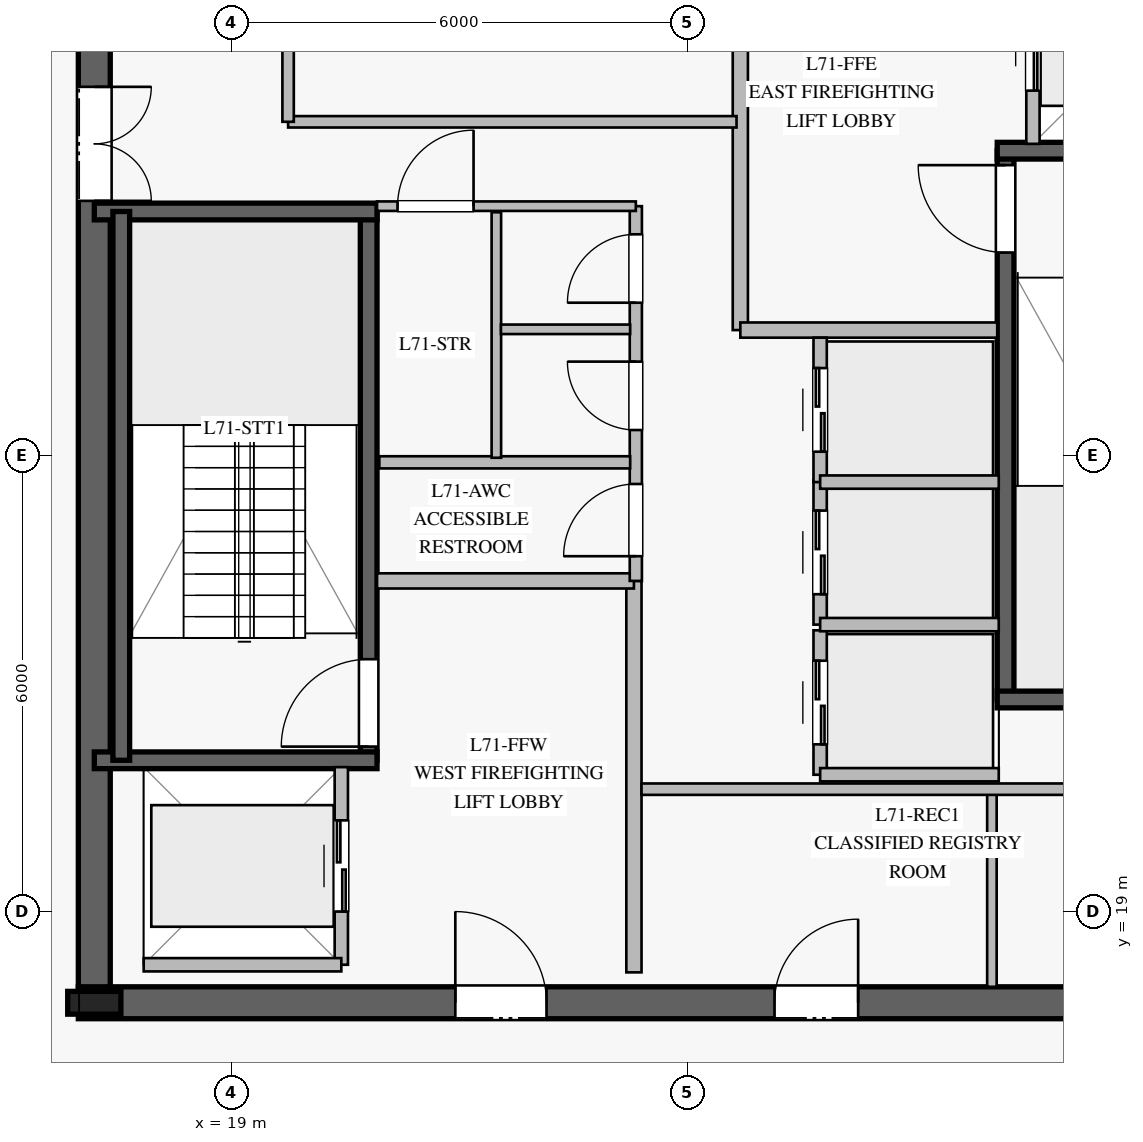
"""IFC4 building model, lengths in metres.
Left out: names, types, materials, properties, quantities, classifications, styles, units other than length and angle.
Written with IfcOpenShell. Run it as: python <this file> out.ifc"""

import sys

from ifc_helpers import new_model, si_unit, direction, frame, frame_2d, origin, origin_2d, place, context, subcontext, project, spatial, rectangle, i_section, extrude, element, fill, save


model = new_model("IFC4")
c1 = context("Model", 3, precision=1e-05, world=origin(), true_north=direction((0.0, 1.0)))
c2 = subcontext(c1, "Body", "Model", "MODEL_VIEW")
j1 = project(units=[si_unit("LENGTHUNIT", "METRE"), si_unit("PLANEANGLEUNIT", "RADIAN")], contexts=[c1])
p1 = place(None, origin())
s1 = spatial("IfcSite", under=j1, at=p1, CompositionType="ELEMENT")
p2 = place(p1, origin())
s2 = spatial("IfcBuilding", under=s1, at=p2, CompositionType="ELEMENT")
p3 = place(p2, frame((0.0, 0.0, 294.2)))
s3 = spatial("IfcBuildingStorey", under=s2, at=p3, CompositionType="ELEMENT", Elevation=294.2)
p4 = place(p3, frame((16.99, 17.8, 0.0), z_axis=(0.0, 0.0, 1.0), x_axis=(1.0, 0.0, 0.0)))
e1 = element("IfcWall", 1, at=p4, inside=s3, PredefinedType="SHEAR", context=c2, shape_type="SweptSolid", body=[
    extrude(rectangle(XDim=16.02, YDim=0.42, at=frame_2d((8.01, 0.0))), origin(), (0.0, 0.0, 1.0), 3.78),
])
p5 = place(p4, frame((4.96, 0.0, 0.0)))
e2 = element("IfcOpeningElement", 2, at=p5, cuts=e1, PredefinedType="OPENING", context=c2, shape_type="SweptSolid", body=[
    extrude(rectangle(XDim=1.2, YDim=2.25, at=frame_2d((0.6, 1.125))), frame((0.0, 0.22, 0.0), z_axis=(0.0, -1.0, 0.0), x_axis=(1.0, 0.0, 0.0)), (0.0, 0.0, 1.0), 0.44),
])
p6 = place(p4, frame((13.91, 0.0, 0.0)))
e3 = element("IfcOpeningElement", 3, at=p6, cuts=e1, PredefinedType="OPENING", context=c2, shape_type="SweptSolid", body=[
    extrude(rectangle(XDim=0.9, YDim=2.1, at=frame_2d((0.45, 1.05))), frame((0.0, 0.22, 0.0), z_axis=(0.0, -1.0, 0.0), x_axis=(1.0, 0.0, 0.0)), (0.0, 0.0, 1.0), 0.44),
])
p7 = place(p4, frame((9.16, 0.0, 0.0)))
e4 = element("IfcOpeningElement", 4, at=p7, cuts=e1, PredefinedType="OPENING", context=c2, shape_type="SweptSolid", body=[
    extrude(rectangle(XDim=1.1, YDim=2.2, at=frame_2d((0.55, 1.1))), frame((0.0, 0.22, 0.0), z_axis=(0.0, -1.0, 0.0), x_axis=(1.0, 0.0, 0.0)), (0.0, 0.0, 1.0), 0.44),
])
p8 = place(p3, frame((17.2, 31.99, 0.0), z_axis=(0.0, 0.0, 1.0), x_axis=(0.0, -1.0, 0.0)))
e5 = element("IfcWall", 5, at=p8, inside=s3, PredefinedType="SHEAR", context=c2, shape_type="SweptSolid", body=[
    extrude(rectangle(XDim=13.98, YDim=0.42, at=frame_2d((6.99, 0.0))), origin(), (0.0, 0.0, 1.0), 3.78),
])
p9 = place(p8, frame((2.14, 0.0, 0.0)))
e6 = element("IfcOpeningElement", 6, at=p9, cuts=e5, PredefinedType="OPENING", context=c2, shape_type="SweptSolid", body=[
    extrude(rectangle(XDim=1.5, YDim=2.2, at=frame_2d((0.75, 1.1))), frame((0.0, 0.22, 0.0), z_axis=(0.0, -1.0, 0.0), x_axis=(1.0, 0.0, 0.0)), (0.0, 0.0, 1.0), 0.44),
])
p10 = place(p3, frame((17.2, 17.8, 0.0), z_axis=(0.0, 0.0, 1.0), x_axis=(1.0, 0.0, 0.0)))
e7 = element("IfcColumn", 7, at=p10, inside=s3, PredefinedType="COLUMN", context=c2, shape_type="SweptSolid", body=[
    extrude(i_section(OverallWidth=0.3, OverallDepth=0.7, WebThickness=0.017, FlangeThickness=0.032, at=origin_2d()), origin(), (0.0, 0.0, 1.0), 4.0),
])
p11 = place(p3, frame((20.81, 20.99, 0.0), z_axis=(0.0, 0.0, 1.0), x_axis=(0.0, 1.0, 0.0)))
e8 = element("IfcWall", 8, at=p11, inside=s3, PredefinedType="SOLIDWALL", context=c2, shape_type="SweptSolid", body=[
    extrude(rectangle(XDim=7.22, YDim=0.22, at=frame_2d((3.61, 0.0))), origin(), (0.0, 0.0, 1.0), 3.78),
])
p12 = place(p11, frame((0.18, 0.0, 0.0)))
e9 = element("IfcOpeningElement", 9, at=p12, cuts=e8, PredefinedType="OPENING", context=c2, shape_type="SweptSolid", body=[
    extrude(rectangle(XDim=1.15, YDim=2.2, at=frame_2d((0.575, 1.1))), frame((0.0, 0.12, 0.0), z_axis=(0.0, -1.0, 0.0), x_axis=(1.0, 0.0, 0.0)), (0.0, 0.0, 1.0), 0.24),
])
for number, where, z_axis, x_axis in (
    (10, (17.2, 20.99, 0.0), (0.0, 0.0, 1.0), (1.0, 0.0, 0.0)),
    (11, (17.2, 28.21, 0.0), (0.0, 0.0, 1.0), (1.0, 0.0, 0.0)),
):
    element("IfcWall", number, at=place(p3, frame(where, z_axis=z_axis, x_axis=x_axis)), inside=s3, PredefinedType="SOLIDWALL", context=c2, shape_type="SweptSolid", body=[
        extrude(rectangle(XDim=3.72, YDim=0.22, at=frame_2d((1.86, 0.0))), origin(), (0.0, 0.0, 1.0), 3.78),
    ])
p13 = place(p3, frame((17.555, 28.21, 0.0), z_axis=(0.0, 0.0, 1.0), x_axis=(0.0, -1.0, 0.0)))
e12 = element("IfcWall", 12, at=p13, inside=s3, PredefinedType="SOLIDWALL", context=c2, shape_type="SweptSolid", body=[
    extrude(rectangle(XDim=7.22, YDim=0.22, at=frame_2d((3.61, 0.0))), origin(), (0.0, 0.0, 1.0), 3.78),
])
p14 = place(p3, frame((29.19, 21.79, 0.0), z_axis=(0.0, 0.0, 1.0), x_axis=(0.0, 1.0, 0.0)))
e13 = element("IfcWall", 13, at=p14, inside=s3, PredefinedType="SOLIDWALL", context=c2, shape_type="SweptSolid", body=[
    extrude(rectangle(XDim=7.22, YDim=0.22, at=frame_2d((3.61, 0.0))), origin(), (0.0, 0.0, 1.0), 3.78),
])
p15 = place(p14, frame((5.88, 0.0, 0.0)))
e14 = element("IfcOpeningElement", 14, at=p15, cuts=e13, PredefinedType="OPENING", context=c2, shape_type="SweptSolid", body=[
    extrude(rectangle(XDim=1.15, YDim=2.2, at=frame_2d((0.575, 1.1))), frame((0.0, 0.12, 0.0), z_axis=(0.0, -1.0, 0.0), x_axis=(1.0, 0.0, 0.0)), (0.0, 0.0, 1.0), 0.24),
])
for number, where, z_axis, x_axis in (
    (15, (29.08, 21.79, 0.0), (0.0, 0.0, 1.0), (1.0, 0.0, 0.0)),
    (16, (29.08, 29.01, 0.0), (0.0, 0.0, 1.0), (1.0, 0.0, 0.0)),
):
    element("IfcWall", number, at=place(p3, frame(where, z_axis=z_axis, x_axis=x_axis)), inside=s3, PredefinedType="SOLIDWALL", context=c2, shape_type="SweptSolid", body=[
        extrude(rectangle(XDim=3.72, YDim=0.22, at=frame_2d((1.86, 0.0))), origin(), (0.0, 0.0, 1.0), 3.78),
    ])
p16 = place(p3, frame((24.3, 18.2, 0.0), z_axis=(0.0, 0.0, 1.0), x_axis=(0.0, 1.0, 0.0)))
e17 = element("IfcWall", 17, at=p16, inside=s3, PredefinedType="PARTITIONING", context=c2, shape_type="SweptSolid", body=[
    extrude(rectangle(XDim=5.15, YDim=0.2, at=frame_2d((2.575, 0.0))), origin(), (0.0, 0.0, 1.0), 3.78),
])
p17 = place(p3, frame((20.92, 23.35, 0.0), z_axis=(0.0, 0.0, 1.0), x_axis=(1.0, 0.0, 0.0)))
e18 = element("IfcWall", 18, at=p17, inside=s3, PredefinedType="PARTITIONING", context=c2, shape_type="SweptSolid", body=[
    extrude(rectangle(XDim=3.38, YDim=0.2, at=frame_2d((1.69, 0.0))), origin(), (0.0, 0.0, 1.0), 3.78),
])
p18 = place(p3, frame((25.7, 26.65, 0.0), z_axis=(0.0, 0.0, 1.0), x_axis=(0.0, 1.0, 0.0)))
e19 = element("IfcWall", 19, at=p18, inside=s3, PredefinedType="PARTITIONING", context=c2, shape_type="SweptSolid", body=[
    extrude(rectangle(XDim=5.15, YDim=0.2, at=frame_2d((2.575, 0.0))), origin(), (0.0, 0.0, 1.0), 3.78),
])
p19 = place(p3, frame((25.7, 26.65, 0.0), z_axis=(0.0, 0.0, 1.0), x_axis=(1.0, 0.0, 0.0)))
e20 = element("IfcWall", 20, at=p19, inside=s3, PredefinedType="PARTITIONING", context=c2, shape_type="SweptSolid", body=[
    extrude(rectangle(XDim=3.38, YDim=0.2, at=frame_2d((1.69, 0.0))), origin(), (0.0, 0.0, 1.0), 3.78),
])
p20 = place(p3, frame((24.325, 23.35, 0.0), z_axis=(0.0, 0.0, 1.0), x_axis=(0.0, 1.0, 0.0)))
e21 = element("IfcWall", 21, at=p20, inside=s3, PredefinedType="PLUMBINGWALL", context=c2, shape_type="SweptSolid", body=[
    extrude(rectangle(XDim=4.93, YDim=0.16, at=frame_2d((2.465, 0.0))), origin(), (0.0, 0.0, 1.0), 3.78),
])
p21 = place(p20, frame((0.325, 0.0, 0.0)))
e22 = element("IfcOpeningElement", 22, at=p21, cuts=e21, PredefinedType="OPENING", context=c2, shape_type="SweptSolid", body=[
    extrude(rectangle(XDim=0.95, YDim=2.1, at=frame_2d((0.475, 1.05))), frame((0.0, 0.09, 0.0), z_axis=(0.0, -1.0, 0.0), x_axis=(1.0, 0.0, 0.0)), (0.0, 0.0, 1.0), 0.18),
])
p22 = place(p20, frame((1.985, 0.0, 0.0)))
e23 = element("IfcOpeningElement", 23, at=p22, cuts=e21, PredefinedType="OPENING", context=c2, shape_type="SweptSolid", body=[
    extrude(rectangle(XDim=0.9, YDim=2.1, at=frame_2d((0.45, 1.05))), frame((0.0, 0.09, 0.0), z_axis=(0.0, -1.0, 0.0), x_axis=(1.0, 0.0, 0.0)), (0.0, 0.0, 1.0), 0.18),
])
p23 = place(p20, frame((3.66, 0.0, 0.0)))
e24 = element("IfcOpeningElement", 24, at=p23, cuts=e21, PredefinedType="OPENING", context=c2, shape_type="SweptSolid", body=[
    extrude(rectangle(XDim=0.9, YDim=2.1, at=frame_2d((0.45, 1.05))), frame((0.0, 0.09, 0.0), z_axis=(0.0, -1.0, 0.0), x_axis=(1.0, 0.0, 0.0)), (0.0, 0.0, 1.0), 0.18),
])
p24 = place(p3, frame((20.92, 28.28, 0.0), z_axis=(0.0, 0.0, 1.0), x_axis=(1.0, 0.0, 0.0)))
e25 = element("IfcWall", 25, at=p24, inside=s3, PredefinedType="PARTITIONING", context=c2, shape_type="SweptSolid", body=[
    extrude(rectangle(XDim=3.405, YDim=0.125, at=frame_2d((1.703, 0.0))), origin(), (0.0, 0.0, 1.0), 3.78),
])
p25 = place(p24, frame((0.27, 0.0, 0.0)))
e26 = element("IfcOpeningElement", 26, at=p25, cuts=e25, PredefinedType="OPENING", context=c2, shape_type="SweptSolid", body=[
    extrude(rectangle(XDim=1.0, YDim=2.15, at=frame_2d((0.5, 1.075))), frame((0.0, 0.073, 0.0), z_axis=(0.0, -1.0, 0.0), x_axis=(1.0, 0.0, 0.0)), (0.0, 0.0, 1.0), 0.145),
])
p26 = place(p3, frame((29.01, 18.01, 0.0), z_axis=(0.0, 0.0, 1.0), x_axis=(0.0, 1.0, 0.0)))
e27 = element("IfcWall", 27, at=p26, inside=s3, PredefinedType="PARTITIONING", context=c2, shape_type="SweptSolid", body=[
    extrude(rectangle(XDim=2.54, YDim=0.125, at=frame_2d((1.27, 0.0))), origin(), (0.0, 0.0, 1.0), 3.78),
])
p27 = place(p3, frame((20.95, 24.91, 0.0), z_axis=(0.0, 0.0, 1.0), x_axis=(1.0, 0.0, 0.0)))
e28 = element("IfcWall", 28, at=p27, inside=s3, PredefinedType="PLUMBINGWALL", context=c2, shape_type="SweptSolid", body=[
    extrude(rectangle(XDim=3.3, YDim=0.16, at=frame_2d((1.65, 0.0))), origin(), (0.0, 0.0, 1.0), 3.78),
])
p28 = place(p3, frame((22.49, 24.97, 0.0), z_axis=(0.0, 0.0, 1.0), x_axis=(0.0, 1.0, 0.0)))
e29 = element("IfcWall", 29, at=p28, inside=s3, PredefinedType="PARTITIONING", context=c2, shape_type="SweptSolid", body=[
    extrude(rectangle(XDim=3.23, YDim=0.125, at=frame_2d((1.615, 0.0))), origin(), (0.0, 0.0, 1.0), 3.78),
])
p29 = place(p3, frame((22.55, 26.66, 0.0), z_axis=(0.0, 0.0, 1.0), x_axis=(1.0, 0.0, 0.0)))
e30 = element("IfcWall", 30, at=p29, inside=s3, PredefinedType="PARTITIONING", context=c2, shape_type="SweptSolid", body=[
    extrude(rectangle(XDim=1.7, YDim=0.125, at=frame_2d((0.85, 0.0))), origin(), (0.0, 0.0, 1.0), 3.78),
])
p30 = place(p3, frame((24.4, 20.61, 0.0), z_axis=(0.0, 0.0, 1.0), x_axis=(1.0, 0.0, 0.0)))
e31 = element("IfcWall", 31, at=p30, inside=s3, PredefinedType="PARTITIONING", context=c2, shape_type="SweptSolid", body=[
    extrude(rectangle(XDim=5.9, YDim=0.15, at=frame_2d((2.95, 0.0))), origin(), (0.0, 0.0, 1.0), 3.78),
])
p31 = place(p3, frame((19.75, 29.39, 0.0), z_axis=(0.0, 0.0, 1.0), x_axis=(1.0, 0.0, 0.0)))
e32 = element("IfcWall", 32, at=p31, inside=s3, PredefinedType="PARTITIONING", context=c2, shape_type="SweptSolid", body=[
    extrude(rectangle(XDim=5.9, YDim=0.15, at=frame_2d((2.95, 0.0))), origin(), (0.0, 0.0, 1.0), 3.78),
])
p32 = place(p3, frame((19.75, 29.39, 0.0), z_axis=(0.0, 0.0, 1.0), x_axis=(0.0, 1.0, 0.0)))
e33 = element("IfcWall", 33, at=p32, inside=s3, PredefinedType="PARTITIONING", context=c2, shape_type="SweptSolid", body=[
    extrude(rectangle(XDim=2.41, YDim=0.15, at=frame_2d((1.205, 0.0))), origin(), (0.0, 0.0, 1.0), 3.78),
])
p33 = place(p3, frame((26.75, 20.8, 0.0), z_axis=(0.0, 0.0, 1.0), x_axis=(0.0, 1.0, 0.0)))
e34 = element("IfcWall", 34, at=p33, inside=s3, PredefinedType="PARTITIONING", context=c2, shape_type="SweptSolid", body=[
    extrude(rectangle(XDim=1.9, YDim=0.175, at=frame_2d((0.95, 0.0))), origin(), (0.0, 0.0, 1.0), 3.78),
])
p34 = place(p33, frame((0.4, 0.0, 0.0)))
e35 = element("IfcOpeningElement", 35, at=p34, cuts=e34, PredefinedType="OPENING", context=c2, shape_type="SweptSolid", body=[
    extrude(rectangle(XDim=1.1, YDim=2.2, at=frame_2d((0.55, 1.1))), frame((0.0, 0.098, 0.0), z_axis=(0.0, -1.0, 0.0), x_axis=(1.0, 0.0, 0.0)), (0.0, 0.0, 1.0), 0.195),
])
p35 = place(p3, frame((26.75, 20.8, 0.0), z_axis=(0.0, 0.0, 1.0), x_axis=(1.0, 0.0, 0.0)))
e36 = element("IfcWall", 36, at=p35, inside=s3, PredefinedType="PARTITIONING", context=c2, shape_type="SweptSolid", body=[
    extrude(rectangle(XDim=2.35, YDim=0.175, at=frame_2d((1.175, 0.0))), origin(), (0.0, 0.0, 1.0), 3.78),
])
p36 = place(p3, frame((26.75, 22.775, 0.0), z_axis=(0.0, 0.0, 1.0), x_axis=(0.0, 1.0, 0.0)))
e37 = element("IfcWall", 37, at=p36, inside=s3, PredefinedType="PARTITIONING", context=c2, shape_type="SweptSolid", body=[
    extrude(rectangle(XDim=1.9, YDim=0.175, at=frame_2d((0.95, 0.0))), origin(), (0.0, 0.0, 1.0), 3.78),
])
p37 = place(p36, frame((0.4, 0.0, 0.0)))
e38 = element("IfcOpeningElement", 38, at=p37, cuts=e37, PredefinedType="OPENING", context=c2, shape_type="SweptSolid", body=[
    extrude(rectangle(XDim=1.1, YDim=2.2, at=frame_2d((0.55, 1.1))), frame((0.0, 0.098, 0.0), z_axis=(0.0, -1.0, 0.0), x_axis=(1.0, 0.0, 0.0)), (0.0, 0.0, 1.0), 0.195),
])
p38 = place(p3, frame((26.75, 22.775, 0.0), z_axis=(0.0, 0.0, 1.0), x_axis=(1.0, 0.0, 0.0)))
e39 = element("IfcWall", 39, at=p38, inside=s3, PredefinedType="PARTITIONING", context=c2, shape_type="SweptSolid", body=[
    extrude(rectangle(XDim=2.35, YDim=0.175, at=frame_2d((1.175, 0.0))), origin(), (0.0, 0.0, 1.0), 3.78),
])
p39 = place(p3, frame((26.75, 24.65, 0.0), z_axis=(0.0, 0.0, 1.0), x_axis=(0.0, 1.0, 0.0)))
e40 = element("IfcWall", 40, at=p39, inside=s3, PredefinedType="PARTITIONING", context=c2, shape_type="SweptSolid", body=[
    extrude(rectangle(XDim=1.9, YDim=0.175, at=frame_2d((0.95, 0.0))), origin(), (0.0, 0.0, 1.0), 3.78),
])
p40 = place(p39, frame((0.4, 0.0, 0.0)))
e41 = element("IfcOpeningElement", 41, at=p40, cuts=e40, PredefinedType="OPENING", context=c2, shape_type="SweptSolid", body=[
    extrude(rectangle(XDim=1.1, YDim=2.2, at=frame_2d((0.55, 1.1))), frame((0.0, 0.098, 0.0), z_axis=(0.0, -1.0, 0.0), x_axis=(1.0, 0.0, 0.0)), (0.0, 0.0, 1.0), 0.195),
])
p41 = place(p3, frame((26.75, 24.65, 0.0), z_axis=(0.0, 0.0, 1.0), x_axis=(1.0, 0.0, 0.0)))
e42 = element("IfcWall", 42, at=p41, inside=s3, PredefinedType="PARTITIONING", context=c2, shape_type="SweptSolid", body=[
    extrude(rectangle(XDim=2.35, YDim=0.175, at=frame_2d((1.175, 0.0))), origin(), (0.0, 0.0, 1.0), 3.78),
])
p42 = place(p3, frame((20.45, 18.3, 0.0), z_axis=(0.0, 0.0, 1.0), x_axis=(0.0, 1.0, 0.0)))
e43 = element("IfcWall", 43, at=p42, inside=s3, PredefinedType="PARTITIONING", context=c2, shape_type="SweptSolid", body=[
    extrude(rectangle(XDim=2.6, YDim=0.175, at=frame_2d((1.3, 0.0))), origin(), (0.0, 0.0, 1.0), 3.78),
])
p43 = place(p42, frame((0.7, 0.0, 0.0)))
e44 = element("IfcOpeningElement", 44, at=p43, cuts=e43, PredefinedType="OPENING", context=c2, shape_type="SweptSolid", body=[
    extrude(rectangle(XDim=1.2, YDim=2.2, at=frame_2d((0.6, 1.1))), frame((0.0, 0.098, 0.0), z_axis=(0.0, -1.0, 0.0), x_axis=(1.0, 0.0, 0.0)), (0.0, 0.0, 1.0), 0.195),
])
p44 = place(p3, frame((17.85, 18.3, 0.0), z_axis=(0.0, 0.0, 1.0), x_axis=(1.0, 0.0, 0.0)))
e45 = element("IfcWall", 45, at=p44, inside=s3, PredefinedType="PARTITIONING", context=c2, shape_type="SweptSolid", body=[
    extrude(rectangle(XDim=2.6, YDim=0.175, at=frame_2d((1.3, 0.0))), origin(), (0.0, 0.0, 1.0), 3.78),
])
p45 = place(p3, frame((29.55, 29.1, 0.0), z_axis=(0.0, 0.0, 1.0), x_axis=(0.0, 1.0, 0.0)))
e46 = element("IfcWall", 46, at=p45, inside=s3, PredefinedType="PARTITIONING", context=c2, shape_type="SweptSolid", body=[
    extrude(rectangle(XDim=2.6, YDim=0.175, at=frame_2d((1.3, 0.0))), origin(), (0.0, 0.0, 1.0), 3.78),
])
p46 = place(p45, frame((0.7, 0.0, 0.0)))
e47 = element("IfcOpeningElement", 47, at=p46, cuts=e46, PredefinedType="OPENING", context=c2, shape_type="SweptSolid", body=[
    extrude(rectangle(XDim=1.2, YDim=2.2, at=frame_2d((0.6, 1.1))), frame((0.0, 0.098, 0.0), z_axis=(0.0, -1.0, 0.0), x_axis=(1.0, 0.0, 0.0)), (0.0, 0.0, 1.0), 0.195),
])
p47 = place(p12, origin())
e48 = element("IfcDoor", 48, at=p47, inside=s3, OperationType="SINGLE_SWING_LEFT", PredefinedType="DOOR", context=c2, shape_type="SweptSolid", body=[
    extrude(rectangle(XDim=1.15, YDim=2.2, at=frame_2d((0.575, 1.1))), frame((0.0, 0.025, 0.0), z_axis=(0.0, -1.0, 0.0), x_axis=(1.0, 0.0, 0.0)), (0.0, 0.0, 1.0), 0.05),
])
fill(e9, e48)
p48 = place(p15, origin())
e49 = element("IfcDoor", 49, at=p48, inside=s3, OperationType="SINGLE_SWING_RIGHT", PredefinedType="DOOR", context=c2, shape_type="SweptSolid", body=[
    extrude(rectangle(XDim=1.15, YDim=2.2, at=frame_2d((0.575, 1.1))), frame((0.0, 0.025, 0.0), z_axis=(0.0, -1.0, 0.0), x_axis=(1.0, 0.0, 0.0)), (0.0, 0.0, 1.0), 0.05),
])
fill(e14, e49)
p49 = place(p5, origin())
e50 = element("IfcDoor", 50, at=p49, inside=s3, OperationType="SINGLE_SWING_LEFT", PredefinedType="DOOR", context=c2, shape_type="SweptSolid", body=[
    extrude(rectangle(XDim=1.2, YDim=2.25, at=frame_2d((0.6, 1.125))), frame((0.0, 0.025, 0.0), z_axis=(0.0, -1.0, 0.0), x_axis=(1.0, 0.0, 0.0)), (0.0, 0.0, 1.0), 0.05),
])
fill(e2, e50)
p50 = place(p9, origin())
e51 = element("IfcDoor", 51, at=p50, inside=s3, OperationType="DOUBLE_DOOR_SINGLE_SWING", PredefinedType="DOOR", context=c2, shape_type="SweptSolid", body=[
    extrude(rectangle(XDim=1.5, YDim=2.2, at=frame_2d((0.75, 1.1))), frame((0.0, 0.025, 0.0), z_axis=(0.0, -1.0, 0.0), x_axis=(1.0, 0.0, 0.0)), (0.0, 0.0, 1.0), 0.05),
])
fill(e6, e51)
p51 = place(p21, origin())
e52 = element("IfcDoor", 52, at=p51, inside=s3, OperationType="SINGLE_SWING_LEFT", PredefinedType="DOOR", context=c2, shape_type="SweptSolid", body=[
    extrude(rectangle(XDim=0.95, YDim=2.1, at=frame_2d((0.475, 1.05))), frame((0.0, 0.025, 0.0), z_axis=(0.0, -1.0, 0.0), x_axis=(1.0, 0.0, 0.0)), (0.0, 0.0, 1.0), 0.05),
])
fill(e22, e52)
p52 = place(p22, origin())
e53 = element("IfcDoor", 53, at=p52, inside=s3, OperationType="SINGLE_SWING_RIGHT", PredefinedType="DOOR", context=c2, shape_type="SweptSolid", body=[
    extrude(rectangle(XDim=0.9, YDim=2.1, at=frame_2d((0.45, 1.05))), frame((0.0, 0.025, 0.0), z_axis=(0.0, -1.0, 0.0), x_axis=(1.0, 0.0, 0.0)), (0.0, 0.0, 1.0), 0.05),
])
fill(e23, e53)
p53 = place(p23, origin())
e54 = element("IfcDoor", 54, at=p53, inside=s3, OperationType="SINGLE_SWING_LEFT", PredefinedType="DOOR", context=c2, shape_type="SweptSolid", body=[
    extrude(rectangle(XDim=0.9, YDim=2.1, at=frame_2d((0.45, 1.05))), frame((0.0, 0.025, 0.0), z_axis=(0.0, -1.0, 0.0), x_axis=(1.0, 0.0, 0.0)), (0.0, 0.0, 1.0), 0.05),
])
fill(e24, e54)
p54 = place(p25, origin())
e55 = element("IfcDoor", 55, at=p54, inside=s3, OperationType="SINGLE_SWING_RIGHT", PredefinedType="DOOR", context=c2, shape_type="SweptSolid", body=[
    extrude(rectangle(XDim=1.0, YDim=2.15, at=frame_2d((0.5, 1.075))), frame((0.0, 0.025, 0.0), z_axis=(0.0, -1.0, 0.0), x_axis=(1.0, 0.0, 0.0)), (0.0, 0.0, 1.0), 0.05),
])
fill(e26, e55)
p55 = place(p7, origin())
e56 = element("IfcDoor", 56, at=p55, inside=s3, OperationType="SINGLE_SWING_RIGHT", PredefinedType="DOOR", context=c2, shape_type="SweptSolid", body=[
    extrude(rectangle(XDim=1.1, YDim=2.2, at=frame_2d((0.55, 1.1))), frame((0.0, 0.025, 0.0), z_axis=(0.0, -1.0, 0.0), x_axis=(1.0, 0.0, 0.0)), (0.0, 0.0, 1.0), 0.05),
])
fill(e4, e56)
p56 = place(p34, origin())
e57 = element("IfcDoor", 57, at=p56, inside=s3, OperationType="DOUBLE_DOOR_SLIDING", PredefinedType="DOOR", context=c2, shape_type="SweptSolid", body=[
    extrude(rectangle(XDim=1.1, YDim=2.2, at=frame_2d((0.55, 1.1))), frame((0.0, 0.025, 0.0), z_axis=(0.0, -1.0, 0.0), x_axis=(1.0, 0.0, 0.0)), (0.0, 0.0, 1.0), 0.05),
])
fill(e35, e57)
p57 = place(p37, origin())
e58 = element("IfcDoor", 58, at=p57, inside=s3, OperationType="DOUBLE_DOOR_SLIDING", PredefinedType="DOOR", context=c2, shape_type="SweptSolid", body=[
    extrude(rectangle(XDim=1.1, YDim=2.2, at=frame_2d((0.55, 1.1))), frame((0.0, 0.025, 0.0), z_axis=(0.0, -1.0, 0.0), x_axis=(1.0, 0.0, 0.0)), (0.0, 0.0, 1.0), 0.05),
])
fill(e38, e58)
p58 = place(p40, origin())
e59 = element("IfcDoor", 59, at=p58, inside=s3, OperationType="DOUBLE_DOOR_SLIDING", PredefinedType="DOOR", context=c2, shape_type="SweptSolid", body=[
    extrude(rectangle(XDim=1.1, YDim=2.2, at=frame_2d((0.55, 1.1))), frame((0.0, 0.025, 0.0), z_axis=(0.0, -1.0, 0.0), x_axis=(1.0, 0.0, 0.0)), (0.0, 0.0, 1.0), 0.05),
])
fill(e41, e59)
p59 = place(p43, origin())
e60 = element("IfcDoor", 60, at=p59, inside=s3, OperationType="DOUBLE_DOOR_SLIDING", PredefinedType="DOOR", context=c2, shape_type="SweptSolid", body=[
    extrude(rectangle(XDim=1.2, YDim=2.2, at=frame_2d((0.6, 1.1))), frame((0.0, 0.025, 0.0), z_axis=(0.0, -1.0, 0.0), x_axis=(1.0, 0.0, 0.0)), (0.0, 0.0, 1.0), 0.05),
])
fill(e44, e60)
p60 = place(p46, origin())
e61 = element("IfcDoor", 61, at=p60, inside=s3, OperationType="DOUBLE_DOOR_SLIDING", PredefinedType="DOOR", context=c2, shape_type="SweptSolid", body=[
    extrude(rectangle(XDim=1.2, YDim=2.2, at=frame_2d((0.6, 1.1))), frame((0.0, 0.025, 0.0), z_axis=(0.0, -1.0, 0.0), x_axis=(1.0, 0.0, 0.0)), (0.0, 0.0, 1.0), 0.05),
])
fill(e47, e61)
save(model, sys.argv[1])
